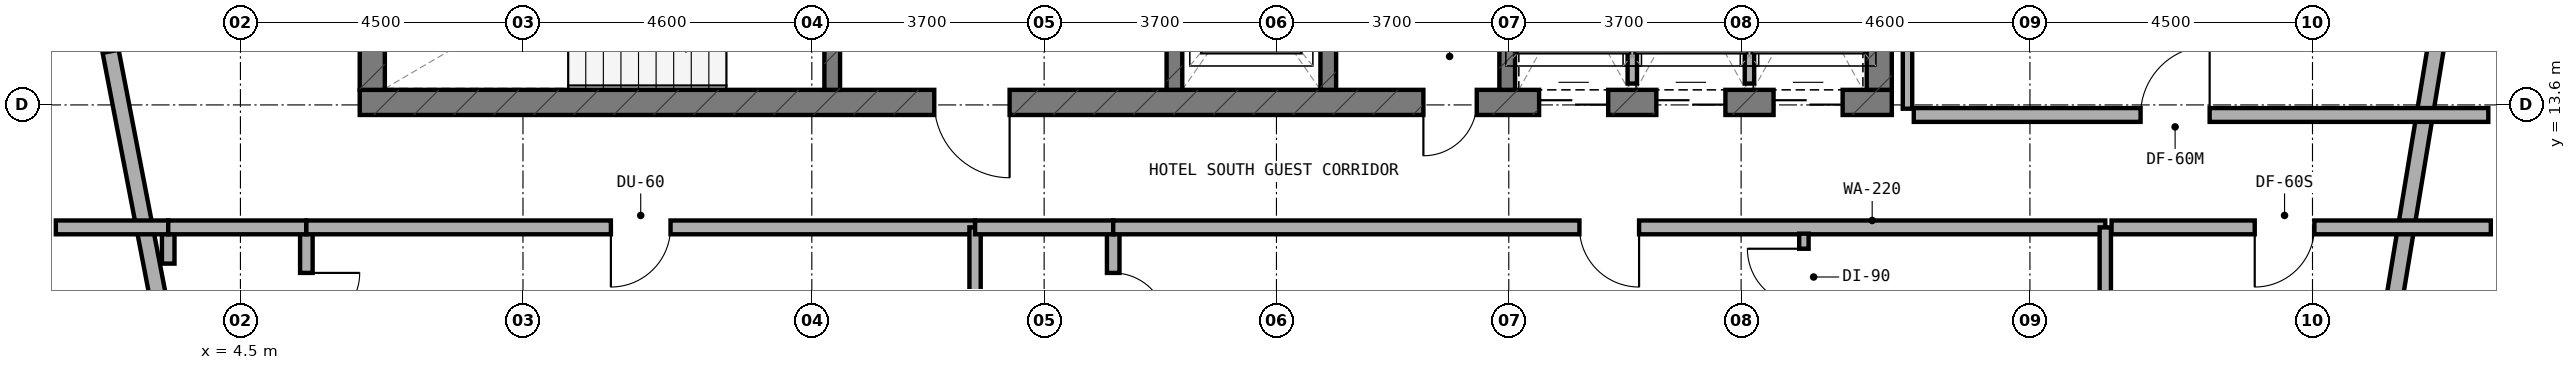
"""IFC4 building model, lengths in metres.
Left out: names, types, materials, properties, quantities, classifications, styles, units other than length and angle.
Written with IfcOpenShell. Run it as: python <this file> out.ifc"""

import sys

from ifc_helpers import new_model, si_unit, direction, frame, frame_2d, origin, place, context, subcontext, project, spatial, rectangle, extrude, element, fill, save


model = new_model("IFC4")
c1 = context("Model", 3, precision=1e-05, world=origin(), true_north=direction((0.0, 1.0)))
c2 = subcontext(c1, "Body", "Model", "MODEL_VIEW")
j1 = project(units=[si_unit("LENGTHUNIT", "METRE"), si_unit("PLANEANGLEUNIT", "RADIAN")], contexts=[c1])
p1 = place(None, origin())
s1 = spatial("IfcSite", under=j1, at=p1, CompositionType="ELEMENT")
p2 = place(p1, origin())
s2 = spatial("IfcBuilding", under=s1, at=p2, CompositionType="ELEMENT")
p3 = place(p2, frame((0.0, 0.0, 191.9)))
s3 = spatial("IfcBuildingStorey", under=s2, at=p3, CompositionType="ELEMENT", Elevation=191.9)
p4 = place(p3, frame((6.4, 13.64, 0.0), z_axis=(0.0, 0.0, 1.0), x_axis=(1.0, 0.0, 0.0)))
e1 = element("IfcWall", 1, at=p4, inside=s3, PredefinedType="SHEAR", context=c2, shape_type="SweptSolid", body=[
    extrude(rectangle(XDim=24.4, YDim=0.4, at=frame_2d((12.2, 0.0))), origin(), (0.0, 0.0, 1.0), 3.6),
])
p5 = place(p4, frame((9.15, 0.0, 0.0)))
e2 = element("IfcOpeningElement", 2, at=p5, cuts=e1, PredefinedType="OPENING", context=c2, shape_type="SweptSolid", body=[
    extrude(rectangle(XDim=1.2, YDim=2.15, at=frame_2d((0.6, 1.075))), frame((0.0, 0.21, 0.0), z_axis=(0.0, -1.0, 0.0), x_axis=(1.0, 0.0, 0.0)), (0.0, 0.0, 1.0), 0.42),
])
p6 = place(p4, frame((16.94, 0.0, 0.0)))
e3 = element("IfcOpeningElement", 3, at=p6, cuts=e1, PredefinedType="OPENING", context=c2, shape_type="SweptSolid", body=[
    extrude(rectangle(XDim=0.85, YDim=2.1, at=frame_2d((0.425, 1.05))), frame((0.0, 0.21, 0.0), z_axis=(0.0, -1.0, 0.0), x_axis=(1.0, 0.0, 0.0)), (0.0, 0.0, 1.0), 0.42),
])
p7 = place(p4, frame((18.783, 0.0, 0.0)))
e4 = element("IfcOpeningElement", 4, at=p7, cuts=e1, PredefinedType="OPENING", context=c2, shape_type="SweptSolid", body=[
    extrude(rectangle(XDim=1.1, YDim=2.15, at=frame_2d((0.55, 1.075))), frame((0.0, 0.21, 0.0), z_axis=(0.0, -1.0, 0.0), x_axis=(1.0, 0.0, 0.0)), (0.0, 0.0, 1.0), 0.42),
])
p8 = place(p4, frame((20.65, 0.0, 0.0)))
e5 = element("IfcOpeningElement", 5, at=p8, cuts=e1, PredefinedType="OPENING", context=c2, shape_type="SweptSolid", body=[
    extrude(rectangle(XDim=1.1, YDim=2.15, at=frame_2d((0.55, 1.075))), frame((0.0, 0.21, 0.0), z_axis=(0.0, -1.0, 0.0), x_axis=(1.0, 0.0, 0.0)), (0.0, 0.0, 1.0), 0.42),
])
p9 = place(p4, frame((22.517, 0.0, 0.0)))
e6 = element("IfcOpeningElement", 6, at=p9, cuts=e1, PredefinedType="OPENING", context=c2, shape_type="SweptSolid", body=[
    extrude(rectangle(XDim=1.1, YDim=2.15, at=frame_2d((0.55, 1.075))), frame((0.0, 0.21, 0.0), z_axis=(0.0, -1.0, 0.0), x_axis=(1.0, 0.0, 0.0)), (0.0, 0.0, 1.0), 0.42),
])
for number, where, z_axis, x_axis in (
    (7, (6.6, 13.84, 0.0), (0.0, 0.0, 1.0), (0.0, 1.0, 0.0)),
    (8, (30.6, 13.84, 0.0), (0.0, 0.0, 1.0), (0.0, 1.0, 0.0)),
):
    element("IfcWall", number, at=place(p3, frame(where, z_axis=z_axis, x_axis=x_axis)), inside=s3, PredefinedType="SHEAR", context=c2, shape_type="SweptSolid", body=[
        extrude(rectangle(XDim=3.16, YDim=0.4, at=frame_2d((1.58, 0.0))), origin(), (0.0, 0.0, 1.0), 3.6),
    ])
p10 = place(p3, frame((13.925, 13.84, 0.0), z_axis=(0.0, 0.0, 1.0), x_axis=(0.0, 1.0, 0.0)))
e9 = element("IfcWall", 9, at=p10, inside=s3, PredefinedType="STANDARD", context=c2, shape_type="SweptSolid", body=[
    extrude(rectangle(XDim=3.16, YDim=0.25, at=frame_2d((1.58, 0.0))), origin(), (0.0, 0.0, 1.0), 3.32),
])
p11 = place(p10, frame((0.98, 0.0, 0.0)))
e10 = element("IfcOpeningElement", 10, at=p11, cuts=e9, PredefinedType="OPENING", context=c2, shape_type="SweptSolid", body=[
    extrude(rectangle(XDim=1.1, YDim=2.15, at=frame_2d((0.55, 1.075))), frame((0.0, 0.135, 0.0), z_axis=(0.0, -1.0, 0.0), x_axis=(1.0, 0.0, 0.0)), (0.0, 0.0, 1.0), 0.27),
])
p12 = place(p3, frame((19.375, 13.84, 0.0), z_axis=(0.0, 0.0, 1.0), x_axis=(0.0, 1.0, 0.0)))
e11 = element("IfcWall", 11, at=p12, inside=s3, PredefinedType="STANDARD", context=c2, shape_type="SweptSolid", body=[
    extrude(rectangle(XDim=3.16, YDim=0.25, at=frame_2d((1.58, 0.0))), origin(), (0.0, 0.0, 1.0), 3.32),
])
p13 = place(p12, frame((0.98, 0.0, 0.0)))
e12 = element("IfcOpeningElement", 12, at=p13, cuts=e11, PredefinedType="OPENING", context=c2, shape_type="SweptSolid", body=[
    extrude(rectangle(XDim=1.1, YDim=2.15, at=frame_2d((0.55, 1.075))), frame((0.0, 0.135, 0.0), z_axis=(0.0, -1.0, 0.0), x_axis=(1.0, 0.0, 0.0)), (0.0, 0.0, 1.0), 0.27),
])
for number, where, z_axis, x_axis in (
    (13, (21.825, 13.84, 0.0), (0.0, 0.0, 1.0), (0.0, 1.0, 0.0)),
    (14, (24.675, 13.84, 0.0), (0.0, 0.0, 1.0), (0.0, 1.0, 0.0)),
):
    element("IfcWall", number, at=place(p3, frame(where, z_axis=z_axis, x_axis=x_axis)), inside=s3, PredefinedType="STANDARD", context=c2, shape_type="SweptSolid", body=[
        extrude(rectangle(XDim=3.16, YDim=0.25, at=frame_2d((1.58, 0.0))), origin(), (0.0, 0.0, 1.0), 3.32),
    ])
p14 = place(p3, frame((38.771, 10.313, 0.0), z_axis=(0.0, 0.0, 1.0), x_axis=(0.16277908586, 0.986662540693, 0.0)))
e15 = element("IfcWall", 15, at=p14, inside=s3, PredefinedType="STANDARD", context=c2, shape_type="SweptSolid", body=[
    extrude(rectangle(XDim=10.437, YDim=0.26, at=frame_2d((5.219, 0.0))), origin(), (0.0, 0.0, 1.0), 3.32),
])
p15 = place(p14, frame((5.81, 0.0, 0.85)))
e16 = element("IfcOpeningElement", 16, at=p15, cuts=e15, PredefinedType="OPENING", context=c2, shape_type="SweptSolid", body=[
    extrude(rectangle(XDim=2.1, YDim=1.5, at=frame_2d((1.05, 0.75))), frame((0.0, 0.14, 0.0), z_axis=(0.0, -1.0, 0.0), x_axis=(1.0, 0.0, 0.0)), (0.0, 0.0, 1.0), 0.28),
])
p16 = place(p3, frame((1.518, 19.199, 0.0), z_axis=(0.0, 0.0, 1.0), x_axis=(0.189254809039, -0.98192801022, 0.0)))
e17 = element("IfcWall", 17, at=p16, inside=s3, PredefinedType="STANDARD", context=c2, shape_type="SweptSolid", body=[
    extrude(rectangle(XDim=9.046, YDim=0.26, at=frame_2d((4.523, 0.0))), origin(), (0.0, 0.0, 1.0), 3.32),
])
p17 = place(p16, frame((2.733, 0.0, 0.85)))
e18 = element("IfcOpeningElement", 18, at=p17, cuts=e17, PredefinedType="OPENING", context=c2, shape_type="SweptSolid", body=[
    extrude(rectangle(XDim=2.1, YDim=1.5, at=frame_2d((1.05, 0.75))), frame((0.0, 0.14, 0.0), z_axis=(0.0, -1.0, 0.0), x_axis=(1.0, 0.0, 0.0)), (0.0, 0.0, 1.0), 0.28),
])
p18 = place(p3, frame((26.667, 13.94, 0.0), z_axis=(0.0, 0.0, 1.0), x_axis=(0.0, 1.0, 0.0)))
e19 = element("IfcWall", 19, at=p18, inside=s3, PredefinedType="PARTITIONING", context=c2, shape_type="SweptSolid", body=[
    extrude(rectangle(XDim=2.96, YDim=0.15, at=frame_2d((1.48, 0.0))), origin(), (0.0, 0.0, 1.0), 3.32),
])
p19 = place(p3, frame((28.533, 13.94, 0.0), z_axis=(0.0, 0.0, 1.0), x_axis=(0.0, 1.0, 0.0)))
e20 = element("IfcWall", 20, at=p19, inside=s3, PredefinedType="PARTITIONING", context=c2, shape_type="SweptSolid", body=[
    extrude(rectangle(XDim=2.96, YDim=0.15, at=frame_2d((1.48, 0.0))), origin(), (0.0, 0.0, 1.0), 2.995),
])
p20 = place(p3, frame((5.55, 9.45, 0.0), z_axis=(0.0, 0.0, 1.0), x_axis=(0.0, 1.0, 0.0)))
e21 = element("IfcWall", 21, at=p20, inside=s3, PredefinedType="PLUMBINGWALL", context=c2, shape_type="SweptSolid", body=[
    extrude(rectangle(XDim=2.1, YDim=0.2, at=frame_2d((1.05, 0.0))), origin(), (0.0, 0.0, 1.0), 3.32),
])
p21 = place(p20, frame((0.625, 0.0, 0.0)))
e22 = element("IfcOpeningElement", 22, at=p21, cuts=e21, PredefinedType="OPENING", context=c2, shape_type="SweptSolid", body=[
    extrude(rectangle(XDim=0.85, YDim=2.1, at=frame_2d((0.425, 1.05))), frame((0.0, 0.11, 0.0), z_axis=(0.0, -1.0, 0.0), x_axis=(1.0, 0.0, 0.0)), (0.0, 0.0, 1.0), 0.22),
])
p22 = place(p3, frame((3.35, 11.073, 0.0), z_axis=(0.0, 0.0, 1.0), x_axis=(0.0, 1.0, 0.0)))
e23 = element("IfcWall", 23, at=p22, inside=s3, PredefinedType="PLUMBINGWALL", context=c2, shape_type="SweptSolid", body=[
    extrude(rectangle(XDim=0.577, YDim=0.2, at=frame_2d((0.289, 0.0))), origin(), (0.0, 0.0, 1.0), 3.32),
])
p23 = place(p3, frame((1.56, 11.65, 0.0), z_axis=(0.0, 0.0, 1.0), x_axis=(1.0, 0.0, 0.0)))
e24 = element("IfcWall", 24, at=p23, inside=s3, PredefinedType="SOLIDWALL", context=c2, shape_type="SweptSolid", body=[
    extrude(rectangle(XDim=1.79, YDim=0.22, at=frame_2d((0.895, 0.0))), origin(), (0.0, 0.0, 1.0), 3.32),
])
p24 = place(p3, frame((3.35, 11.65, 0.0), z_axis=(0.0, 0.0, 1.0), x_axis=(1.0, 0.0, 0.0)))
e25 = element("IfcWall", 25, at=p24, inside=s3, PredefinedType="SOLIDWALL", context=c2, shape_type="SweptSolid", body=[
    extrude(rectangle(XDim=2.2, YDim=0.22, at=frame_2d((1.1, 0.0))), origin(), (0.0, 0.0, 1.0), 3.32),
])
p25 = place(p3, frame((5.55, 11.65, 0.0), z_axis=(0.0, 0.0, 1.0), x_axis=(1.0, 0.0, 0.0)))
e26 = element("IfcWall", 26, at=p25, inside=s3, PredefinedType="SOLIDWALL", context=c2, shape_type="SweptSolid", body=[
    extrude(rectangle(XDim=10.65, YDim=0.22, at=frame_2d((5.325, 0.0))), origin(), (0.0, 0.0, 1.0), 2.995),
])
p26 = place(p25, frame((4.85, 0.0, 0.0)))
e27 = element("IfcOpeningElement", 27, at=p26, cuts=e26, PredefinedType="OPENING", context=c2, shape_type="SweptSolid", body=[
    extrude(rectangle(XDim=0.95, YDim=2.1, at=frame_2d((0.475, 1.05))), frame((0.0, 0.12, 0.0), z_axis=(0.0, -1.0, 0.0), x_axis=(1.0, 0.0, 0.0)), (0.0, 0.0, 1.0), 0.24),
])
p27 = place(p3, frame((16.2, 5.46, 0.0), z_axis=(0.0, 0.0, 1.0), x_axis=(0.0, 1.0, 0.0)))
e28 = element("IfcWall", 28, at=p27, inside=s3, PredefinedType="SOLIDWALL", context=c2, shape_type="SweptSolid", body=[
    extrude(rectangle(XDim=6.19, YDim=0.18, at=frame_2d((3.095, 0.0))), origin(), (0.0, 0.0, 1.0), 2.935),
])
p28 = place(p3, frame((18.4, 9.45, 0.0), z_axis=(0.0, 0.0, 1.0), x_axis=(0.0, 1.0, 0.0)))
e29 = element("IfcWall", 29, at=p28, inside=s3, PredefinedType="PLUMBINGWALL", context=c2, shape_type="SweptSolid", body=[
    extrude(rectangle(XDim=2.1, YDim=0.2, at=frame_2d((1.05, 0.0))), origin(), (0.0, 0.0, 1.0), 2.935),
])
p29 = place(p28, frame((0.625, 0.0, 0.0)))
e30 = element("IfcOpeningElement", 30, at=p29, cuts=e29, PredefinedType="OPENING", context=c2, shape_type="SweptSolid", body=[
    extrude(rectangle(XDim=0.85, YDim=2.1, at=frame_2d((0.425, 1.05))), frame((0.0, 0.11, 0.0), z_axis=(0.0, -1.0, 0.0), x_axis=(1.0, 0.0, 0.0)), (0.0, 0.0, 1.0), 0.22),
])
p30 = place(p3, frame((16.2, 11.65, 0.0), z_axis=(0.0, 0.0, 1.0), x_axis=(1.0, 0.0, 0.0)))
e31 = element("IfcWall", 31, at=p30, inside=s3, PredefinedType="SOLIDWALL", context=c2, shape_type="SweptSolid", body=[
    extrude(rectangle(XDim=2.2, YDim=0.22, at=frame_2d((1.1, 0.0))), origin(), (0.0, 0.0, 1.0), 2.995),
])
p31 = place(p3, frame((18.4, 11.65, 0.0), z_axis=(0.0, 0.0, 1.0), x_axis=(1.0, 0.0, 0.0)))
e32 = element("IfcWall", 32, at=p31, inside=s3, PredefinedType="SOLIDWALL", context=c2, shape_type="SweptSolid", body=[
    extrude(rectangle(XDim=15.8, YDim=0.22, at=frame_2d((7.9, 0.0))), origin(), (0.0, 0.0, 1.0), 2.995),
])
p32 = place(p31, frame((7.425, 0.0, 0.0)))
e33 = element("IfcOpeningElement", 33, at=p32, cuts=e32, PredefinedType="OPENING", context=c2, shape_type="SweptSolid", body=[
    extrude(rectangle(XDim=0.95, YDim=2.1, at=frame_2d((0.475, 1.05))), frame((0.0, 0.12, 0.0), z_axis=(0.0, -1.0, 0.0), x_axis=(1.0, 0.0, 0.0)), (0.0, 0.0, 1.0), 0.24),
])
p33 = place(p3, frame((29.4, 6.047, 0.0), z_axis=(0.0, 0.0, 1.0), x_axis=(0.0, 1.0, 0.0)))
e34 = element("IfcWall", 34, at=p33, inside=s3, PredefinedType="PARTITIONING", context=c2, shape_type="SweptSolid", body=[
    extrude(rectangle(XDim=5.503, YDim=0.15, at=frame_2d((2.751, 0.0))), origin(), (0.0, 0.0, 1.0), 2.935),
])
p34 = place(p33, frame((4.363, 0.0, 0.0)))
e35 = element("IfcOpeningElement", 35, at=p34, cuts=e34, PredefinedType="OPENING", context=c2, shape_type="SweptSolid", body=[
    extrude(rectangle(XDim=0.9, YDim=2.1, at=frame_2d((0.45, 1.05))), frame((0.0, 0.085, 0.0), z_axis=(0.0, -1.0, 0.0), x_axis=(1.0, 0.0, 0.0)), (0.0, 0.0, 1.0), 0.17),
])
p35 = place(p3, frame((34.2, 6.872, 0.0), z_axis=(0.0, 0.0, 1.0), x_axis=(0.0, 1.0, 0.0)))
e36 = element("IfcWall", 36, at=p35, inside=s3, PredefinedType="SOLIDWALL", context=c2, shape_type="SweptSolid", body=[
    extrude(rectangle(XDim=4.778, YDim=0.18, at=frame_2d((2.389, 0.0))), origin(), (0.0, 0.0, 1.0), 2.935),
])
p36 = place(p3, frame((34.3, 11.65, 0.0), z_axis=(0.0, 0.0, 1.0), x_axis=(1.0, 0.0, 0.0)))
e37 = element("IfcWall", 37, at=p36, inside=s3, PredefinedType="SOLIDWALL", context=c2, shape_type="SweptSolid", body=[
    extrude(rectangle(XDim=6.04, YDim=0.22, at=frame_2d((3.02, 0.0))), origin(), (0.0, 0.0, 1.0), 2.935),
])
p37 = place(p36, frame((2.28, 0.0, 0.0)))
e38 = element("IfcOpeningElement", 38, at=p37, cuts=e37, PredefinedType="OPENING", context=c2, shape_type="SweptSolid", body=[
    extrude(rectangle(XDim=0.95, YDim=2.1, at=frame_2d((0.475, 1.05))), frame((0.0, 0.12, 0.0), z_axis=(0.0, -1.0, 0.0), x_axis=(1.0, 0.0, 0.0)), (0.0, 0.0, 1.0), 0.24),
])
p38 = place(p3, frame((31.05, 13.54, 0.0), z_axis=(0.0, 0.0, 1.0), x_axis=(0.0, 1.0, 0.0)))
e39 = element("IfcWall", 39, at=p38, inside=s3, PredefinedType="PARTITIONING", context=c2, shape_type="SweptSolid", body=[
    extrude(rectangle(XDim=6.66, YDim=0.15, at=frame_2d((3.33, 0.0))), origin(), (0.0, 0.0, 1.0), 2.995),
])
p39 = place(p3, frame((31.15, 13.44, 0.0), z_axis=(0.0, 0.0, 1.0), x_axis=(1.0, 0.0, 0.0)))
e40 = element("IfcWall", 40, at=p39, inside=s3, PredefinedType="SOLIDWALL", context=c2, shape_type="SweptSolid", body=[
    extrude(rectangle(XDim=9.15, YDim=0.22, at=frame_2d((4.575, 0.0))), origin(), (0.0, 0.0, 1.0), 2.935),
])
p40 = place(p39, frame((3.612, 0.0, 0.0)))
e41 = element("IfcOpeningElement", 41, at=p40, cuts=e40, PredefinedType="OPENING", context=c2, shape_type="SweptSolid", body=[
    extrude(rectangle(XDim=1.1, YDim=2.1, at=frame_2d((0.55, 1.05))), frame((0.0, 0.12, 0.0), z_axis=(0.0, -1.0, 0.0), x_axis=(1.0, 0.0, 0.0)), (0.0, 0.0, 1.0), 0.24),
])
p41 = place(p5, frame((1.2, 0.0, 0.0), z_axis=(0.0, 0.0, 1.0), x_axis=(-1.0, 0.0, 0.0)))
e42 = element("IfcDoor", 42, at=p41, inside=s3, OperationType="SINGLE_SWING_LEFT", PredefinedType="DOOR", context=c2, shape_type="SweptSolid", body=[
    extrude(rectangle(XDim=1.2, YDim=2.15, at=frame_2d((0.6, 1.075))), frame((0.0, 0.025, 0.0), z_axis=(0.0, -1.0, 0.0), x_axis=(1.0, 0.0, 0.0)), (0.0, 0.0, 1.0), 0.05),
])
fill(e2, e42)
p42 = place(p6, frame((0.85, 0.0, 0.0), z_axis=(0.0, 0.0, 1.0), x_axis=(-1.0, 0.0, 0.0)))
e43 = element("IfcDoor", 43, at=p42, inside=s3, OperationType="SINGLE_SWING_RIGHT", PredefinedType="DOOR", context=c2, shape_type="SweptSolid", body=[
    extrude(rectangle(XDim=0.85, YDim=2.1, at=frame_2d((0.425, 1.05))), frame((0.0, 0.025, 0.0), z_axis=(0.0, -1.0, 0.0), x_axis=(1.0, 0.0, 0.0)), (0.0, 0.0, 1.0), 0.05),
])
fill(e3, e43)
p43 = place(p7, frame((1.1, 0.0, 0.0), z_axis=(0.0, 0.0, 1.0), x_axis=(-1.0, 0.0, 0.0)))
e44 = element("IfcDoor", 44, at=p43, inside=s3, OperationType="DOUBLE_DOOR_SLIDING", PredefinedType="DOOR", context=c2, shape_type="SweptSolid", body=[
    extrude(rectangle(XDim=1.1, YDim=2.15, at=frame_2d((0.55, 1.075))), frame((0.0, 0.025, 0.0), z_axis=(0.0, -1.0, 0.0), x_axis=(1.0, 0.0, 0.0)), (0.0, 0.0, 1.0), 0.05),
])
fill(e4, e44)
p44 = place(p8, frame((1.1, 0.0, 0.0), z_axis=(0.0, 0.0, 1.0), x_axis=(-1.0, 0.0, 0.0)))
e45 = element("IfcDoor", 45, at=p44, inside=s3, OperationType="DOUBLE_DOOR_SLIDING", PredefinedType="DOOR", context=c2, shape_type="SweptSolid", body=[
    extrude(rectangle(XDim=1.1, YDim=2.15, at=frame_2d((0.55, 1.075))), frame((0.0, 0.025, 0.0), z_axis=(0.0, -1.0, 0.0), x_axis=(1.0, 0.0, 0.0)), (0.0, 0.0, 1.0), 0.05),
])
fill(e5, e45)
p45 = place(p9, frame((1.1, 0.0, 0.0), z_axis=(0.0, 0.0, 1.0), x_axis=(-1.0, 0.0, 0.0)))
e46 = element("IfcDoor", 46, at=p45, inside=s3, OperationType="DOUBLE_DOOR_SLIDING", PredefinedType="DOOR", context=c2, shape_type="SweptSolid", body=[
    extrude(rectangle(XDim=1.1, YDim=2.15, at=frame_2d((0.55, 1.075))), frame((0.0, 0.025, 0.0), z_axis=(0.0, -1.0, 0.0), x_axis=(1.0, 0.0, 0.0)), (0.0, 0.0, 1.0), 0.05),
])
fill(e6, e46)
p46 = place(p21, frame((0.85, 0.0, 0.0), z_axis=(0.0, 0.0, 1.0), x_axis=(-1.0, 0.0, 0.0)))
e47 = element("IfcDoor", 47, at=p46, inside=s3, OperationType="SINGLE_SWING_LEFT", PredefinedType="DOOR", context=c2, shape_type="SweptSolid", body=[
    extrude(rectangle(XDim=0.85, YDim=2.1, at=frame_2d((0.425, 1.05))), frame((0.0, 0.025, 0.0), z_axis=(0.0, -1.0, 0.0), x_axis=(1.0, 0.0, 0.0)), (0.0, 0.0, 1.0), 0.05),
])
fill(e22, e47)
p47 = place(p26, frame((0.95, 0.0, 0.0), z_axis=(0.0, 0.0, 1.0), x_axis=(-1.0, 0.0, 0.0)))
e48 = element("IfcDoor", 48, at=p47, inside=s3, OperationType="SINGLE_SWING_RIGHT", PredefinedType="DOOR", context=c2, shape_type="SweptSolid", body=[
    extrude(rectangle(XDim=0.95, YDim=2.1, at=frame_2d((0.475, 1.05))), frame((0.0, 0.025, 0.0), z_axis=(0.0, -1.0, 0.0), x_axis=(1.0, 0.0, 0.0)), (0.0, 0.0, 1.0), 0.05),
])
fill(e27, e48)
p48 = place(p29, frame((0.85, 0.0, 0.0), z_axis=(0.0, 0.0, 1.0), x_axis=(-1.0, 0.0, 0.0)))
e49 = element("IfcDoor", 49, at=p48, inside=s3, OperationType="SINGLE_SWING_RIGHT", PredefinedType="DOOR", context=c2, shape_type="SweptSolid", body=[
    extrude(rectangle(XDim=0.85, YDim=2.1, at=frame_2d((0.425, 1.05))), frame((0.0, 0.025, 0.0), z_axis=(0.0, -1.0, 0.0), x_axis=(1.0, 0.0, 0.0)), (0.0, 0.0, 1.0), 0.05),
])
fill(e30, e49)
p49 = place(p32, frame((0.95, 0.0, 0.0), z_axis=(0.0, 0.0, 1.0), x_axis=(-1.0, 0.0, 0.0)))
e50 = element("IfcDoor", 50, at=p49, inside=s3, OperationType="SINGLE_SWING_LEFT", PredefinedType="DOOR", context=c2, shape_type="SweptSolid", body=[
    extrude(rectangle(XDim=0.95, YDim=2.1, at=frame_2d((0.475, 1.05))), frame((0.0, 0.025, 0.0), z_axis=(0.0, -1.0, 0.0), x_axis=(1.0, 0.0, 0.0)), (0.0, 0.0, 1.0), 0.05),
])
fill(e33, e50)
p50 = place(p34, origin())
e51 = element("IfcDoor", 51, at=p50, inside=s3, OperationType="SINGLE_SWING_RIGHT", PredefinedType="DOOR", context=c2, shape_type="SweptSolid", body=[
    extrude(rectangle(XDim=0.9, YDim=2.1, at=frame_2d((0.45, 1.05))), frame((0.0, 0.025, 0.0), z_axis=(0.0, -1.0, 0.0), x_axis=(1.0, 0.0, 0.0)), (0.0, 0.0, 1.0), 0.05),
])
fill(e35, e51)
p51 = place(p37, frame((0.95, 0.0, 0.0), z_axis=(0.0, 0.0, 1.0), x_axis=(-1.0, 0.0, 0.0)))
e52 = element("IfcDoor", 52, at=p51, inside=s3, OperationType="SINGLE_SWING_RIGHT", PredefinedType="DOOR", context=c2, shape_type="SweptSolid", body=[
    extrude(rectangle(XDim=0.95, YDim=2.1, at=frame_2d((0.475, 1.05))), frame((0.0, 0.025, 0.0), z_axis=(0.0, -1.0, 0.0), x_axis=(1.0, 0.0, 0.0)), (0.0, 0.0, 1.0), 0.05),
])
fill(e38, e52)
p52 = place(p40, origin())
e53 = element("IfcDoor", 53, at=p52, inside=s3, OperationType="SINGLE_SWING_RIGHT", PredefinedType="DOOR", context=c2, shape_type="SweptSolid", body=[
    extrude(rectangle(XDim=1.1, YDim=2.1, at=frame_2d((0.55, 1.05))), frame((0.0, 0.025, 0.0), z_axis=(0.0, -1.0, 0.0), x_axis=(1.0, 0.0, 0.0)), (0.0, 0.0, 1.0), 0.05),
])
fill(e41, e53)
save(model, sys.argv[1])
